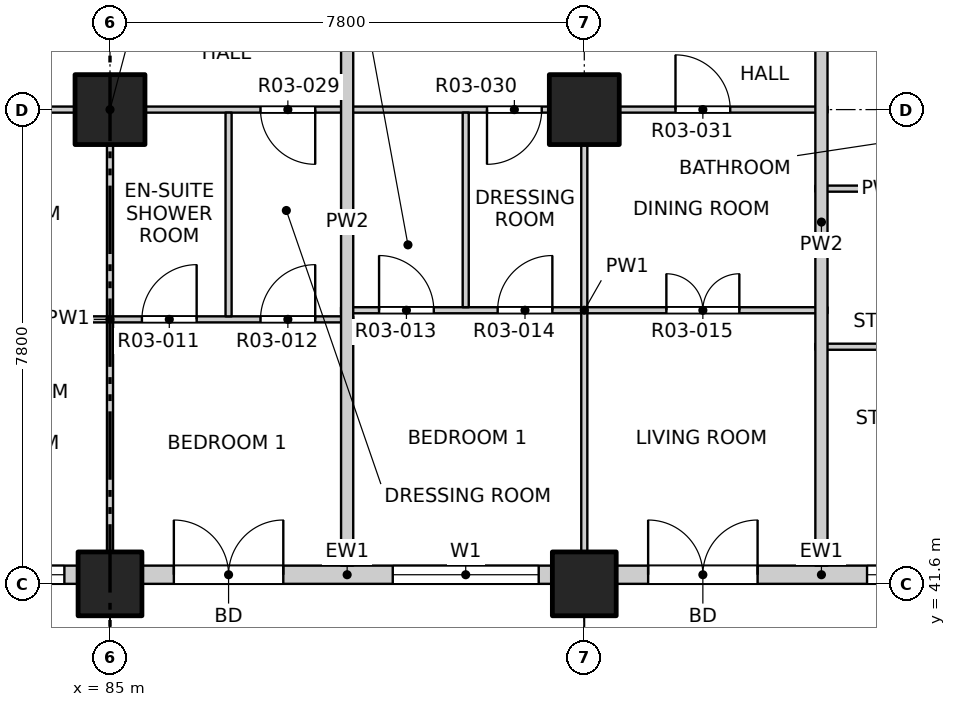
"""IFC4 building model, lengths in metres.
Left out: names, types, materials, properties, quantities, classifications, styles, units other than length and angle.
Written with IfcOpenShell. Run it as: python <this file> out.ifc"""

import sys

from ifc_helpers import new_model, si_unit, direction, frame, frame_2d, origin, origin_2d, place, context, subcontext, project, spatial, rectangle, extrude, element, fill, save


model = new_model("IFC4")
c1 = context("Model", 3, precision=1e-05, world=origin(), true_north=direction((0.0, 1.0)))
c2 = subcontext(c1, "Body", "Model", "MODEL_VIEW")
j1 = project(units=[si_unit("LENGTHUNIT", "METRE"), si_unit("PLANEANGLEUNIT", "RADIAN")], contexts=[c1])
p1 = place(None, origin())
s1 = spatial("IfcSite", under=j1, at=p1, CompositionType="ELEMENT")
p2 = place(p1, origin())
s2 = spatial("IfcBuilding", under=s1, at=p2, CompositionType="ELEMENT")
p3 = place(p2, frame((0.0, 0.0, 43.3)))
s3 = spatial("IfcBuildingStorey", under=s2, at=p3, CompositionType="ELEMENT", Elevation=43.3)
for number, where, z_axis, x_axis in (
    (1, (85.0, 41.6, -0.25), (0.0, 0.0, 1.0), (1.0, 0.0, 0.0)),
    (2, (92.8, 41.6, -0.25), (0.0, 0.0, 1.0), (1.0, 0.0, 0.0)),
):
    element("IfcColumn", number, at=place(p3, frame(where, z_axis=z_axis, x_axis=x_axis)), inside=s3, PredefinedType="COLUMN", context=c2, shape_type="SweptSolid", body=[
        extrude(rectangle(XDim=1.05, YDim=1.05, at=origin_2d()), origin(), (0.0, 0.0, 1.0), 3.35),
    ])
for number, where, z_axis, x_axis in (
    (3, (85.0, 49.4, -0.25), (0.0, 0.0, 1.0), (1.0, 0.0, 0.0)),
    (4, (92.8, 49.4, -0.25), (0.0, 0.0, 1.0), (1.0, 0.0, 0.0)),
):
    element("IfcColumn", number, at=place(p3, frame(where, z_axis=z_axis, x_axis=x_axis)), inside=s3, PredefinedType="COLUMN", context=c2, shape_type="SweptSolid", body=[
        extrude(rectangle(XDim=1.15, YDim=1.15, at=origin_2d()), origin(), (0.0, 0.0, 1.0), 3.35),
    ])
p4 = place(p3, frame((77.725, 41.75, 0.0), z_axis=(0.0, 0.0, 1.0), x_axis=(1.0, 0.0, 0.0)))
e5 = element("IfcWall", 5, at=p4, inside=s3, PredefinedType="SOLIDWALL", context=c2, shape_type="SweptSolid", body=[
    extrude(rectangle(XDim=6.75, YDim=0.3, at=frame_2d((3.375, 0.0))), origin(), (0.0, 0.0, 1.0), 3.1),
])
p5 = place(p4, frame((0.525, 0.0, 0.0)))
e6 = element("IfcOpeningElement", 6, at=p5, cuts=e5, PredefinedType="OPENING", context=c2, shape_type="SweptSolid", body=[
    extrude(rectangle(XDim=1.8, YDim=2.4, at=frame_2d((0.9, 1.2))), frame((0.0, 0.16, 0.0), z_axis=(0.0, -1.0, 0.0), x_axis=(1.0, 0.0, 0.0)), (0.0, 0.0, 1.0), 0.32),
])
p6 = place(p4, frame((4.125, 0.0, 0.9)))
e7 = element("IfcOpeningElement", 7, at=p6, cuts=e5, PredefinedType="OPENING", context=c2, shape_type="SweptSolid", body=[
    extrude(rectangle(XDim=2.4, YDim=1.8, at=frame_2d((1.2, 0.9))), frame((0.0, 0.16, 0.0), z_axis=(0.0, -1.0, 0.0), x_axis=(1.0, 0.0, 0.0)), (0.0, 0.0, 1.0), 0.32),
])
p7 = place(p3, frame((85.525, 41.75, 0.0), z_axis=(0.0, 0.0, 1.0), x_axis=(1.0, 0.0, 0.0)))
e8 = element("IfcWall", 8, at=p7, inside=s3, PredefinedType="SOLIDWALL", context=c2, shape_type="SweptSolid", body=[
    extrude(rectangle(XDim=6.75, YDim=0.3, at=frame_2d((3.375, 0.0))), origin(), (0.0, 0.0, 1.0), 3.1),
])
p8 = place(p7, frame((0.525, 0.0, 0.0)))
e9 = element("IfcOpeningElement", 9, at=p8, cuts=e8, PredefinedType="OPENING", context=c2, shape_type="SweptSolid", body=[
    extrude(rectangle(XDim=1.8, YDim=2.4, at=frame_2d((0.9, 1.2))), frame((0.0, 0.16, 0.0), z_axis=(0.0, -1.0, 0.0), x_axis=(1.0, 0.0, 0.0)), (0.0, 0.0, 1.0), 0.32),
])
p9 = place(p7, frame((4.125, 0.0, 0.9)))
e10 = element("IfcOpeningElement", 10, at=p9, cuts=e8, PredefinedType="OPENING", context=c2, shape_type="SweptSolid", body=[
    extrude(rectangle(XDim=2.4, YDim=1.8, at=frame_2d((1.2, 0.9))), frame((0.0, 0.16, 0.0), z_axis=(0.0, -1.0, 0.0), x_axis=(1.0, 0.0, 0.0)), (0.0, 0.0, 1.0), 0.32),
])
p10 = place(p3, frame((93.325, 41.75, 0.0), z_axis=(0.0, 0.0, 1.0), x_axis=(1.0, 0.0, 0.0)))
e11 = element("IfcWall", 11, at=p10, inside=s3, PredefinedType="SOLIDWALL", context=c2, shape_type="SweptSolid", body=[
    extrude(rectangle(XDim=6.75, YDim=0.3, at=frame_2d((3.375, 0.0))), origin(), (0.0, 0.0, 1.0), 3.1),
])
p11 = place(p10, frame((0.525, 0.0, 0.0)))
e12 = element("IfcOpeningElement", 12, at=p11, cuts=e11, PredefinedType="OPENING", context=c2, shape_type="SweptSolid", body=[
    extrude(rectangle(XDim=1.8, YDim=2.4, at=frame_2d((0.9, 1.2))), frame((0.0, 0.16, 0.0), z_axis=(0.0, -1.0, 0.0), x_axis=(1.0, 0.0, 0.0)), (0.0, 0.0, 1.0), 0.32),
])
p12 = place(p10, frame((4.125, 0.0, 0.9)))
e13 = element("IfcOpeningElement", 13, at=p12, cuts=e11, PredefinedType="OPENING", context=c2, shape_type="SweptSolid", body=[
    extrude(rectangle(XDim=2.4, YDim=1.8, at=frame_2d((1.2, 0.9))), frame((0.0, 0.16, 0.0), z_axis=(0.0, -1.0, 0.0), x_axis=(1.0, 0.0, 0.0)), (0.0, 0.0, 1.0), 0.32),
])
p13 = place(p3, frame((96.6, 45.5, 0.0), z_axis=(0.0, 0.0, 1.0), x_axis=(1.0, 0.0, 0.0)))
e14 = element("IfcWall", 14, at=p13, inside=s3, PredefinedType="PARTITIONING", context=c2, shape_type="SweptSolid", body=[
    extrude(rectangle(XDim=11.5, YDim=0.1, at=frame_2d((5.75, 0.0))), origin(), (0.0, 0.0, 1.0), 3.1),
])
p14 = place(p13, frame((2.635, 0.0, 0.0)))
e15 = element("IfcOpeningElement", 15, at=p14, cuts=e14, PredefinedType="OPENING", context=c2, shape_type="SweptSolid", body=[
    extrude(rectangle(XDim=0.9, YDim=2.1, at=frame_2d((0.45, 1.05))), frame((0.0, 0.06, 0.0), z_axis=(0.0, -1.0, 0.0), x_axis=(1.0, 0.0, 0.0)), (0.0, 0.0, 1.0), 0.12),
])
p15 = place(p3, frame((81.0, 45.95, 0.0), z_axis=(0.0, 0.0, 1.0), x_axis=(1.0, 0.0, 0.0)))
e16 = element("IfcWall", 16, at=p15, inside=s3, PredefinedType="PARTITIONING", context=c2, shape_type="SweptSolid", body=[
    extrude(rectangle(XDim=8.0, YDim=0.1, at=frame_2d((4.0, 0.0))), origin(), (0.0, 0.0, 1.0), 3.1),
])
p16 = place(p15, frame((1.45, 0.0, 0.0)))
e17 = element("IfcOpeningElement", 17, at=p16, cuts=e16, PredefinedType="OPENING", context=c2, shape_type="SweptSolid", body=[
    extrude(rectangle(XDim=1.2, YDim=2.1, at=frame_2d((0.6, 1.05))), frame((0.0, 0.06, 0.0), z_axis=(0.0, -1.0, 0.0), x_axis=(1.0, 0.0, 0.0)), (0.0, 0.0, 1.0), 0.12),
])
p17 = place(p15, frame((4.525, 0.0, 0.0)))
e18 = element("IfcOpeningElement", 18, at=p17, cuts=e16, PredefinedType="OPENING", context=c2, shape_type="SweptSolid", body=[
    extrude(rectangle(XDim=0.9, YDim=2.1, at=frame_2d((0.45, 1.05))), frame((0.0, 0.06, 0.0), z_axis=(0.0, -1.0, 0.0), x_axis=(1.0, 0.0, 0.0)), (0.0, 0.0, 1.0), 0.12),
])
p18 = place(p15, frame((6.475, 0.0, 0.0)))
e19 = element("IfcOpeningElement", 19, at=p18, cuts=e16, PredefinedType="OPENING", context=c2, shape_type="SweptSolid", body=[
    extrude(rectangle(XDim=0.9, YDim=2.1, at=frame_2d((0.45, 1.05))), frame((0.0, 0.06, 0.0), z_axis=(0.0, -1.0, 0.0), x_axis=(1.0, 0.0, 0.0)), (0.0, 0.0, 1.0), 0.12),
])
p19 = place(p3, frame((88.8, 46.1, 0.0), z_axis=(0.0, 0.0, 1.0), x_axis=(1.0, 0.0, 0.0)))
e20 = element("IfcWall", 20, at=p19, inside=s3, PredefinedType="PARTITIONING", context=c2, shape_type="SweptSolid", body=[
    extrude(rectangle(XDim=8.0, YDim=0.1, at=frame_2d((4.0, 0.0))), origin(), (0.0, 0.0, 1.0), 3.1),
])
p20 = place(p19, frame((0.625, 0.0, 0.0)))
e21 = element("IfcOpeningElement", 21, at=p20, cuts=e20, PredefinedType="OPENING", context=c2, shape_type="SweptSolid", body=[
    extrude(rectangle(XDim=0.9, YDim=2.1, at=frame_2d((0.45, 1.05))), frame((0.0, 0.06, 0.0), z_axis=(0.0, -1.0, 0.0), x_axis=(1.0, 0.0, 0.0)), (0.0, 0.0, 1.0), 0.12),
])
p21 = place(p19, frame((2.575, 0.0, 0.0)))
e22 = element("IfcOpeningElement", 22, at=p21, cuts=e20, PredefinedType="OPENING", context=c2, shape_type="SweptSolid", body=[
    extrude(rectangle(XDim=0.9, YDim=2.1, at=frame_2d((0.45, 1.05))), frame((0.0, 0.06, 0.0), z_axis=(0.0, -1.0, 0.0), x_axis=(1.0, 0.0, 0.0)), (0.0, 0.0, 1.0), 0.12),
])
p22 = place(p19, frame((5.35, 0.0, 0.0)))
e23 = element("IfcOpeningElement", 23, at=p22, cuts=e20, PredefinedType="OPENING", context=c2, shape_type="SweptSolid", body=[
    extrude(rectangle(XDim=1.2, YDim=2.1, at=frame_2d((0.6, 1.05))), frame((0.0, 0.06, 0.0), z_axis=(0.0, -1.0, 0.0), x_axis=(1.0, 0.0, 0.0)), (0.0, 0.0, 1.0), 0.12),
])
p23 = place(p3, frame((96.6, 48.1, 0.0), z_axis=(0.0, 0.0, 1.0), x_axis=(1.0, 0.0, 0.0)))
e24 = element("IfcWall", 24, at=p23, inside=s3, PredefinedType="PARTITIONING", context=c2, shape_type="SweptSolid", body=[
    extrude(rectangle(XDim=2.22, YDim=0.1, at=frame_2d((1.11, 0.0))), origin(), (0.0, 0.0, 1.0), 3.1),
])
p24 = place(p3, frame((73.2, 49.4, 0.0), z_axis=(0.0, 0.0, 1.0), x_axis=(1.0, 0.0, 0.0)))
e25 = element("IfcWall", 25, at=p24, inside=s3, PredefinedType="PARTITIONING", context=c2, shape_type="SweptSolid", body=[
    extrude(rectangle(XDim=23.6, YDim=0.1, at=frame_2d((11.8, 0.0))), origin(), (0.0, 0.0, 1.0), 3.1),
])
p25 = place(p24, frame((1.6, 0.0, 0.0)))
e26 = element("IfcOpeningElement", 26, at=p25, cuts=e25, PredefinedType="OPENING", context=c2, shape_type="SweptSolid", body=[
    extrude(rectangle(XDim=0.9, YDim=2.1, at=frame_2d((0.45, 1.05))), frame((0.0, 0.06, 0.0), z_axis=(0.0, -1.0, 0.0), x_axis=(1.0, 0.0, 0.0)), (0.0, 0.0, 1.0), 0.12),
])
p26 = place(p24, frame((6.475, 0.0, 0.0)))
e27 = element("IfcOpeningElement", 27, at=p26, cuts=e25, PredefinedType="OPENING", context=c2, shape_type="SweptSolid", body=[
    extrude(rectangle(XDim=0.9, YDim=2.1, at=frame_2d((0.45, 1.05))), frame((0.0, 0.06, 0.0), z_axis=(0.0, -1.0, 0.0), x_axis=(1.0, 0.0, 0.0)), (0.0, 0.0, 1.0), 0.12),
])
p27 = place(p24, frame((9.4, 0.0, 0.0)))
e28 = element("IfcOpeningElement", 28, at=p27, cuts=e25, PredefinedType="OPENING", context=c2, shape_type="SweptSolid", body=[
    extrude(rectangle(XDim=0.9, YDim=2.1, at=frame_2d((0.45, 1.05))), frame((0.0, 0.06, 0.0), z_axis=(0.0, -1.0, 0.0), x_axis=(1.0, 0.0, 0.0)), (0.0, 0.0, 1.0), 0.12),
])
p28 = place(p24, frame((14.275, 0.0, 0.0)))
e29 = element("IfcOpeningElement", 29, at=p28, cuts=e25, PredefinedType="OPENING", context=c2, shape_type="SweptSolid", body=[
    extrude(rectangle(XDim=0.9, YDim=2.1, at=frame_2d((0.45, 1.05))), frame((0.0, 0.06, 0.0), z_axis=(0.0, -1.0, 0.0), x_axis=(1.0, 0.0, 0.0)), (0.0, 0.0, 1.0), 0.12),
])
p29 = place(p24, frame((18.0, 0.0, 0.0)))
e30 = element("IfcOpeningElement", 30, at=p29, cuts=e25, PredefinedType="OPENING", context=c2, shape_type="SweptSolid", body=[
    extrude(rectangle(XDim=0.9, YDim=2.1, at=frame_2d((0.45, 1.05))), frame((0.0, 0.06, 0.0), z_axis=(0.0, -1.0, 0.0), x_axis=(1.0, 0.0, 0.0)), (0.0, 0.0, 1.0), 0.12),
])
p30 = place(p24, frame((21.1, 0.0, 0.0)))
e31 = element("IfcOpeningElement", 31, at=p30, cuts=e25, PredefinedType="OPENING", context=c2, shape_type="SweptSolid", body=[
    extrude(rectangle(XDim=0.9, YDim=2.1, at=frame_2d((0.45, 1.05))), frame((0.0, 0.06, 0.0), z_axis=(0.0, -1.0, 0.0), x_axis=(1.0, 0.0, 0.0)), (0.0, 0.0, 1.0), 0.12),
])
p31 = place(p3, frame((85.0, 41.9, 0.0), z_axis=(0.0, 0.0, 1.0), x_axis=(0.0, 1.0, 0.0)))
e32 = element("IfcWall", 32, at=p31, inside=s3, PredefinedType="PARTITIONING", context=c2, shape_type="SweptSolid", body=[
    extrude(rectangle(XDim=7.45, YDim=0.1, at=frame_2d((3.725, 0.0))), origin(), (0.0, 0.0, 1.0), 3.1),
])
p32 = place(p3, frame((86.95, 46.0, 0.0), z_axis=(0.0, 0.0, 1.0), x_axis=(0.0, 1.0, 0.0)))
e33 = element("IfcWall", 33, at=p32, inside=s3, PredefinedType="PARTITIONING", context=c2, shape_type="SweptSolid", body=[
    extrude(rectangle(XDim=3.35, YDim=0.1, at=frame_2d((1.675, 0.0))), origin(), (0.0, 0.0, 1.0), 3.1),
])
p33 = place(p3, frame((88.9, 41.9, 0.0), z_axis=(0.0, 0.0, 1.0), x_axis=(0.0, 1.0, 0.0)))
e34 = element("IfcWall", 34, at=p33, inside=s3, PredefinedType="PARTITIONING", context=c2, shape_type="SweptSolid", body=[
    extrude(rectangle(XDim=11.3, YDim=0.2, at=frame_2d((5.65, 0.0))), origin(), (0.0, 0.0, 1.0), 3.1),
])
p34 = place(p3, frame((90.85, 46.15, 0.0), z_axis=(0.0, 0.0, 1.0), x_axis=(0.0, 1.0, 0.0)))
e35 = element("IfcWall", 35, at=p34, inside=s3, PredefinedType="PARTITIONING", context=c2, shape_type="SweptSolid", body=[
    extrude(rectangle(XDim=3.2, YDim=0.1, at=frame_2d((1.6, 0.0))), origin(), (0.0, 0.0, 1.0), 3.1),
])
p35 = place(p3, frame((92.8, 41.9, 0.0), z_axis=(0.0, 0.0, 1.0), x_axis=(0.0, 1.0, 0.0)))
e36 = element("IfcWall", 36, at=p35, inside=s3, PredefinedType="PARTITIONING", context=c2, shape_type="SweptSolid", body=[
    extrude(rectangle(XDim=7.45, YDim=0.1, at=frame_2d((3.725, 0.0))), origin(), (0.0, 0.0, 1.0), 3.1),
])
p36 = place(p3, frame((96.7, 41.9, 0.0), z_axis=(0.0, 0.0, 1.0), x_axis=(0.0, 1.0, 0.0)))
e37 = element("IfcWall", 37, at=p36, inside=s3, PredefinedType="PARTITIONING", context=c2, shape_type="SweptSolid", body=[
    extrude(rectangle(XDim=11.3, YDim=0.2, at=frame_2d((5.65, 0.0))), origin(), (0.0, 0.0, 1.0), 3.1),
])
p37 = place(p6, origin())
e38 = element("IfcWindow", 38, at=p37, inside=s3, PartitioningType="DOUBLE_PANEL_VERTICAL", PredefinedType="WINDOW", context=c2, shape_type="SweptSolid", body=[
    extrude(rectangle(XDim=2.4, YDim=1.8, at=frame_2d((1.2, 0.9))), frame((0.0, 0.03, 0.0), z_axis=(0.0, -1.0, 0.0), x_axis=(1.0, 0.0, 0.0)), (0.0, 0.0, 1.0), 0.06),
])
fill(e7, e38)
p38 = place(p8, origin())
e39 = element("IfcDoor", 39, at=p38, inside=s3, OperationType="DOUBLE_DOOR_SINGLE_SWING", PredefinedType="DOOR", context=c2, shape_type="SweptSolid", body=[
    extrude(rectangle(XDim=1.8, YDim=2.4, at=frame_2d((0.9, 1.2))), frame((0.0, 0.025, 0.0), z_axis=(0.0, -1.0, 0.0), x_axis=(1.0, 0.0, 0.0)), (0.0, 0.0, 1.0), 0.05),
])
fill(e9, e39)
p39 = place(p9, origin())
e40 = element("IfcWindow", 40, at=p39, inside=s3, PartitioningType="DOUBLE_PANEL_VERTICAL", PredefinedType="WINDOW", context=c2, shape_type="SweptSolid", body=[
    extrude(rectangle(XDim=2.4, YDim=1.8, at=frame_2d((1.2, 0.9))), frame((0.0, 0.03, 0.0), z_axis=(0.0, -1.0, 0.0), x_axis=(1.0, 0.0, 0.0)), (0.0, 0.0, 1.0), 0.06),
])
fill(e10, e40)
p40 = place(p11, origin())
e41 = element("IfcDoor", 41, at=p40, inside=s3, OperationType="DOUBLE_DOOR_SINGLE_SWING", PredefinedType="DOOR", context=c2, shape_type="SweptSolid", body=[
    extrude(rectangle(XDim=1.8, YDim=2.4, at=frame_2d((0.9, 1.2))), frame((0.0, 0.025, 0.0), z_axis=(0.0, -1.0, 0.0), x_axis=(1.0, 0.0, 0.0)), (0.0, 0.0, 1.0), 0.05),
])
fill(e12, e41)
p41 = place(p12, origin())
e42 = element("IfcWindow", 42, at=p41, inside=s3, PartitioningType="DOUBLE_PANEL_VERTICAL", PredefinedType="WINDOW", context=c2, shape_type="SweptSolid", body=[
    extrude(rectangle(XDim=2.4, YDim=1.8, at=frame_2d((1.2, 0.9))), frame((0.0, 0.03, 0.0), z_axis=(0.0, -1.0, 0.0), x_axis=(1.0, 0.0, 0.0)), (0.0, 0.0, 1.0), 0.06),
])
fill(e13, e42)
p42 = place(p17, origin())
e43 = element("IfcDoor", 43, at=p42, inside=s3, OperationType="SINGLE_SWING_RIGHT", PredefinedType="DOOR", context=c2, shape_type="SweptSolid", body=[
    extrude(rectangle(XDim=0.9, YDim=2.1, at=frame_2d((0.45, 1.05))), frame((0.0, 0.025, 0.0), z_axis=(0.0, -1.0, 0.0), x_axis=(1.0, 0.0, 0.0)), (0.0, 0.0, 1.0), 0.05),
])
fill(e18, e43)
p43 = place(p18, origin())
e44 = element("IfcDoor", 44, at=p43, inside=s3, OperationType="SINGLE_SWING_RIGHT", PredefinedType="DOOR", context=c2, shape_type="SweptSolid", body=[
    extrude(rectangle(XDim=0.9, YDim=2.1, at=frame_2d((0.45, 1.05))), frame((0.0, 0.025, 0.0), z_axis=(0.0, -1.0, 0.0), x_axis=(1.0, 0.0, 0.0)), (0.0, 0.0, 1.0), 0.05),
])
fill(e19, e44)
p44 = place(p20, origin())
e45 = element("IfcDoor", 45, at=p44, inside=s3, OperationType="SINGLE_SWING_LEFT", PredefinedType="DOOR", context=c2, shape_type="SweptSolid", body=[
    extrude(rectangle(XDim=0.9, YDim=2.1, at=frame_2d((0.45, 1.05))), frame((0.0, 0.025, 0.0), z_axis=(0.0, -1.0, 0.0), x_axis=(1.0, 0.0, 0.0)), (0.0, 0.0, 1.0), 0.05),
])
fill(e21, e45)
p45 = place(p21, origin())
e46 = element("IfcDoor", 46, at=p45, inside=s3, OperationType="SINGLE_SWING_RIGHT", PredefinedType="DOOR", context=c2, shape_type="SweptSolid", body=[
    extrude(rectangle(XDim=0.9, YDim=2.1, at=frame_2d((0.45, 1.05))), frame((0.0, 0.025, 0.0), z_axis=(0.0, -1.0, 0.0), x_axis=(1.0, 0.0, 0.0)), (0.0, 0.0, 1.0), 0.05),
])
fill(e22, e46)
p46 = place(p22, origin())
e47 = element("IfcDoor", 47, at=p46, inside=s3, OperationType="DOUBLE_DOOR_SINGLE_SWING", PredefinedType="DOOR", context=c2, shape_type="SweptSolid", body=[
    extrude(rectangle(XDim=1.2, YDim=2.1, at=frame_2d((0.6, 1.05))), frame((0.0, 0.025, 0.0), z_axis=(0.0, -1.0, 0.0), x_axis=(1.0, 0.0, 0.0)), (0.0, 0.0, 1.0), 0.05),
])
fill(e23, e47)
p47 = place(p28, origin())
e48 = element("IfcDoor", 48, at=p47, inside=s3, OperationType="SINGLE_SWING_LEFT", PredefinedType="DOOR", context=c2, shape_type="SweptSolid", body=[
    extrude(rectangle(XDim=0.9, YDim=2.1, at=frame_2d((0.45, 1.05))), frame((0.0, 0.025, 0.0), z_axis=(0.0, -1.0, 0.0), x_axis=(1.0, 0.0, 0.0)), (0.0, 0.0, 1.0), 0.05),
])
fill(e29, e48)
p48 = place(p29, origin())
e49 = element("IfcDoor", 49, at=p48, inside=s3, OperationType="SINGLE_SWING_RIGHT", PredefinedType="DOOR", context=c2, shape_type="SweptSolid", body=[
    extrude(rectangle(XDim=0.9, YDim=2.1, at=frame_2d((0.45, 1.05))), frame((0.0, 0.025, 0.0), z_axis=(0.0, -1.0, 0.0), x_axis=(1.0, 0.0, 0.0)), (0.0, 0.0, 1.0), 0.05),
])
fill(e30, e49)
p49 = place(p30, origin())
e50 = element("IfcDoor", 50, at=p49, inside=s3, OperationType="SINGLE_SWING_LEFT", PredefinedType="DOOR", context=c2, shape_type="SweptSolid", body=[
    extrude(rectangle(XDim=0.9, YDim=2.1, at=frame_2d((0.45, 1.05))), frame((0.0, 0.025, 0.0), z_axis=(0.0, -1.0, 0.0), x_axis=(1.0, 0.0, 0.0)), (0.0, 0.0, 1.0), 0.05),
])
fill(e31, e50)
save(model, sys.argv[1])
